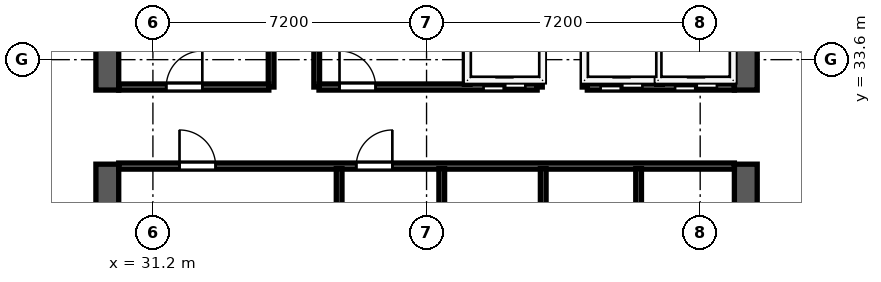
"""IFC4 building model, lengths in metres.
Left out: names, types, materials, properties, quantities, classifications, styles, units other than length and angle.
Written with IfcOpenShell. Run it as: python <this file> out.ifc"""

import sys

from ifc_helpers import new_model, si_unit, direction, frame, frame_2d, origin, place, context, subcontext, project, spatial, rectangle, extrude, element, fill, save


model = new_model("IFC4")
c1 = context("Model", 3, precision=1e-05, world=origin(), true_north=direction((0.0, 1.0)))
c2 = subcontext(c1, "Body", "Model", "MODEL_VIEW")
j1 = project(units=[si_unit("LENGTHUNIT", "METRE"), si_unit("PLANEANGLEUNIT", "RADIAN")], contexts=[c1])
p1 = place(None, origin())
s1 = spatial("IfcSite", under=j1, at=p1, CompositionType="ELEMENT")
p2 = place(p1, origin())
s2 = spatial("IfcBuilding", under=s1, at=p2, CompositionType="ELEMENT")
p3 = place(p2, frame((0.0, 0.0, 223.0)))
s3 = spatial("IfcBuildingStorey", under=s2, at=p3, CompositionType="ELEMENT", Elevation=223.0)
p4 = place(p3, frame((30.0, 26.7, 0.0), z_axis=(0.0, 0.0, 1.0), x_axis=(0.0, 1.0, 0.0)))
e1 = element("IfcWall", 1, at=p4, inside=s3, PredefinedType="SHEAR", context=c2, shape_type="SweptSolid", body=[
    extrude(rectangle(XDim=4.15, YDim=0.6, at=frame_2d((2.075, 0.0))), origin(), (0.0, 0.0, 1.0), 3.62),
])
p5 = place(p3, frame((30.0, 32.8, 0.0), z_axis=(0.0, 0.0, 1.0), x_axis=(0.0, 1.0, 0.0)))
e2 = element("IfcWall", 2, at=p5, inside=s3, PredefinedType="SHEAR", context=c2, shape_type="SweptSolid", body=[
    extrude(rectangle(XDim=10.1, YDim=0.6, at=frame_2d((5.05, 0.0))), origin(), (0.0, 0.0, 1.0), 3.62),
])
p6 = place(p3, frame((46.8, 26.7, 0.0), z_axis=(0.0, 0.0, 1.0), x_axis=(0.0, 1.0, 0.0)))
e3 = element("IfcWall", 3, at=p6, inside=s3, PredefinedType="SHEAR", context=c2, shape_type="SweptSolid", body=[
    extrude(rectangle(XDim=4.15, YDim=0.6, at=frame_2d((2.075, 0.0))), origin(), (0.0, 0.0, 1.0), 3.62),
])
p7 = place(p3, frame((46.8, 32.8, 0.0), z_axis=(0.0, 0.0, 1.0), x_axis=(0.0, 1.0, 0.0)))
e4 = element("IfcWall", 4, at=p7, inside=s3, PredefinedType="SHEAR", context=c2, shape_type="SweptSolid", body=[
    extrude(rectangle(XDim=10.1, YDim=0.6, at=frame_2d((5.05, 0.0))), origin(), (0.0, 0.0, 1.0), 3.62),
])
for number, where, z_axis, x_axis in (
    (5, (34.31, 32.88, 0.0), (0.0, 0.0, 1.0), (0.0, 1.0, 0.0)),
    (6, (35.51, 32.88, 0.0), (0.0, 0.0, 1.0), (0.0, 1.0, 0.0)),
    (7, (41.37, 32.88, 0.0), (0.0, 0.0, 1.0), (0.0, 1.0, 0.0)),
    (8, (42.57, 32.88, 0.0), (0.0, 0.0, 1.0), (0.0, 1.0, 0.0)),
):
    element("IfcWall", number, at=place(p3, frame(where, z_axis=z_axis, x_axis=x_axis)), inside=s3, PredefinedType="SOLIDWALL", context=c2, shape_type="SweptSolid", body=[
        extrude(rectangle(XDim=2.17, YDim=0.15, at=frame_2d((1.085, 0.0))), origin(), (0.0, 0.0, 1.0), 3.62),
    ])
p8 = place(p3, frame((30.3, 32.88, 0.0), z_axis=(0.0, 0.0, 1.0), x_axis=(1.0, 0.0, 0.0)))
e9 = element("IfcWall", 9, at=p8, inside=s3, PredefinedType="SOLIDWALL", context=c2, shape_type="SweptSolid", body=[
    extrude(rectangle(XDim=3.95, YDim=0.16, at=frame_2d((1.975, 0.0))), origin(), (0.0, 0.0, 1.0), 3.62),
])
p9 = place(p8, frame((2.2, 0.0, 0.0), z_axis=(0.0, 0.0, 1.0), x_axis=(-1.0, 0.0, 0.0)))
e10 = element("IfcOpeningElement", 10, at=p9, cuts=e9, PredefinedType="OPENING", context=c2, shape_type="SweptSolid", body=[
    extrude(rectangle(XDim=0.95, YDim=2.12, at=frame_2d((0.475, 1.06))), frame((0.0, 0.09, 0.0), z_axis=(0.0, -1.0, 0.0), x_axis=(1.0, 0.0, 0.0)), (0.0, 0.0, 1.0), 0.18),
])
p10 = place(p3, frame((35.57, 32.88, 0.0), z_axis=(0.0, 0.0, 1.0), x_axis=(1.0, 0.0, 0.0)))
e11 = element("IfcWall", 11, at=p10, inside=s3, PredefinedType="SOLIDWALL", context=c2, shape_type="SweptSolid", body=[
    extrude(rectangle(XDim=5.74, YDim=0.16, at=frame_2d((2.87, 0.0))), origin(), (0.0, 0.0, 1.0), 3.62),
])
p11 = place(p10, frame((1.49, 0.0, 0.0), z_axis=(0.0, 0.0, 1.0), x_axis=(-1.0, 0.0, 0.0)))
e12 = element("IfcOpeningElement", 12, at=p11, cuts=e11, PredefinedType="OPENING", context=c2, shape_type="SweptSolid", body=[
    extrude(rectangle(XDim=0.95, YDim=2.12, at=frame_2d((0.475, 1.06))), frame((0.0, 0.09, 0.0), z_axis=(0.0, -1.0, 0.0), x_axis=(1.0, 0.0, 0.0)), (0.0, 0.0, 1.0), 0.18),
])
p12 = place(p10, frame((5.43, 0.0, 0.0), z_axis=(0.0, 0.0, 1.0), x_axis=(-1.0, 0.0, 0.0)))
e13 = element("IfcOpeningElement", 13, at=p12, cuts=e11, PredefinedType="OPENING", context=c2, shape_type="SweptSolid", body=[
    extrude(rectangle(XDim=1.1, YDim=2.2, at=frame_2d((0.55, 1.1))), frame((0.0, 0.09, 0.0), z_axis=(0.0, -1.0, 0.0), x_axis=(1.0, 0.0, 0.0)), (0.0, 0.0, 1.0), 0.18),
])
p13 = place(p3, frame((42.63, 32.88, 0.0), z_axis=(0.0, 0.0, 1.0), x_axis=(1.0, 0.0, 0.0)))
e14 = element("IfcWall", 14, at=p13, inside=s3, PredefinedType="SOLIDWALL", context=c2, shape_type="SweptSolid", body=[
    extrude(rectangle(XDim=3.87, YDim=0.16, at=frame_2d((1.935, 0.0))), origin(), (0.0, 0.0, 1.0), 3.62),
])
p14 = place(p13, frame((1.45, 0.0, 0.0), z_axis=(0.0, 0.0, 1.0), x_axis=(-1.0, 0.0, 0.0)))
e15 = element("IfcOpeningElement", 15, at=p14, cuts=e14, PredefinedType="OPENING", context=c2, shape_type="SweptSolid", body=[
    extrude(rectangle(XDim=1.1, YDim=2.2, at=frame_2d((0.55, 1.1))), frame((0.0, 0.09, 0.0), z_axis=(0.0, -1.0, 0.0), x_axis=(1.0, 0.0, 0.0)), (0.0, 0.0, 1.0), 0.18),
])
p15 = place(p13, frame((3.41, 0.0, 0.0), z_axis=(0.0, 0.0, 1.0), x_axis=(-1.0, 0.0, 0.0)))
e16 = element("IfcOpeningElement", 16, at=p15, cuts=e14, PredefinedType="OPENING", context=c2, shape_type="SweptSolid", body=[
    extrude(rectangle(XDim=1.1, YDim=2.2, at=frame_2d((0.55, 1.1))), frame((0.0, 0.09, 0.0), z_axis=(0.0, -1.0, 0.0), x_axis=(1.0, 0.0, 0.0)), (0.0, 0.0, 1.0), 0.18),
])
for number, where, z_axis, x_axis in (
    (17, (39.47, 32.95, 0.0), (0.0, 0.0, 1.0), (0.0, 1.0, 0.0)),
    (18, (44.53, 32.95, 0.0), (0.0, 0.0, 1.0), (0.0, 1.0, 0.0)),
):
    element("IfcWall", number, at=place(p3, frame(where, z_axis=z_axis, x_axis=x_axis)), inside=s3, PredefinedType="SOLIDWALL", context=c2, shape_type="SweptSolid", body=[
        extrude(rectangle(XDim=2.05, YDim=0.15, at=frame_2d((1.025, 0.0))), origin(), (0.0, 0.0, 1.0), 3.62),
    ])
p16 = place(p3, frame((30.3, 30.8, 0.0), z_axis=(0.0, 0.0, 1.0), x_axis=(1.0, 0.0, 0.0)))
e19 = element("IfcWall", 19, at=p16, inside=s3, PredefinedType="SOLIDWALL", context=c2, shape_type="SweptSolid", body=[
    extrude(rectangle(XDim=16.2, YDim=0.16, at=frame_2d((8.1, 0.0))), origin(), (0.0, 0.0, 1.0), 3.62),
])
p17 = place(p16, frame((1.6, 0.0, 0.0)))
e20 = element("IfcOpeningElement", 20, at=p17, cuts=e19, PredefinedType="OPENING", context=c2, shape_type="SweptSolid", body=[
    extrude(rectangle(XDim=0.95, YDim=2.12, at=frame_2d((0.475, 1.06))), frame((0.0, 0.09, 0.0), z_axis=(0.0, -1.0, 0.0), x_axis=(1.0, 0.0, 0.0)), (0.0, 0.0, 1.0), 0.18),
])
p18 = place(p16, frame((6.25, 0.0, 0.0)))
e21 = element("IfcOpeningElement", 21, at=p18, cuts=e19, PredefinedType="OPENING", context=c2, shape_type="SweptSolid", body=[
    extrude(rectangle(XDim=0.95, YDim=2.12, at=frame_2d((0.475, 1.06))), frame((0.0, 0.09, 0.0), z_axis=(0.0, -1.0, 0.0), x_axis=(1.0, 0.0, 0.0)), (0.0, 0.0, 1.0), 0.18),
])
p19 = place(p3, frame((38.8, 26.71, 0.0), z_axis=(0.0, 0.0, 1.0), x_axis=(0.0, 1.0, 0.0)))
e22 = element("IfcWall", 22, at=p19, inside=s3, PredefinedType="SOLIDWALL", context=c2, shape_type="SweptSolid", body=[
    extrude(rectangle(XDim=4.025, YDim=0.15, at=frame_2d((2.013, 0.0))), origin(), (0.0, 0.0, 1.0), 3.62),
])
p20 = place(p3, frame((36.1, 26.71, 0.0), z_axis=(0.0, 0.0, 1.0), x_axis=(0.0, 1.0, 0.0)))
e23 = element("IfcWall", 23, at=p20, inside=s3, PredefinedType="PARTITIONING", context=c2, shape_type="SweptSolid", body=[
    extrude(rectangle(XDim=4.025, YDim=0.15, at=frame_2d((2.013, 0.0))), origin(), (0.0, 0.0, 1.0), 3.62),
])
for number, where, z_axis, x_axis in (
    (24, (41.47, 28.75, 0.0), (0.0, 0.0, 1.0), (0.0, 1.0, 0.0)),
    (25, (43.98, 28.75, 0.0), (0.0, 0.0, 1.0), (0.0, 1.0, 0.0)),
):
    element("IfcWall", number, at=place(p3, frame(where, z_axis=z_axis, x_axis=x_axis)), inside=s3, PredefinedType="SOLIDWALL", context=c2, shape_type="SweptSolid", body=[
        extrude(rectangle(XDim=1.985, YDim=0.15, at=frame_2d((0.993, 0.0))), origin(), (0.0, 0.0, 1.0), 3.62),
    ])
p21 = place(p9, origin())
e26 = element("IfcDoor", 26, at=p21, inside=s3, OperationType="SINGLE_SWING_LEFT", PredefinedType="DOOR", context=c2, shape_type="SweptSolid", body=[
    extrude(rectangle(XDim=0.95, YDim=2.12, at=frame_2d((0.475, 1.06))), frame((0.0, 0.025, 0.0), z_axis=(0.0, -1.0, 0.0), x_axis=(1.0, 0.0, 0.0)), (0.0, 0.0, 1.0), 0.05),
])
fill(e10, e26)
p22 = place(p11, origin())
e27 = element("IfcDoor", 27, at=p22, inside=s3, OperationType="SINGLE_SWING_RIGHT", PredefinedType="DOOR", context=c2, shape_type="SweptSolid", body=[
    extrude(rectangle(XDim=0.95, YDim=2.12, at=frame_2d((0.475, 1.06))), frame((0.0, 0.025, 0.0), z_axis=(0.0, -1.0, 0.0), x_axis=(1.0, 0.0, 0.0)), (0.0, 0.0, 1.0), 0.05),
])
fill(e12, e27)
p23 = place(p12, origin())
e28 = element("IfcDoor", 28, at=p23, inside=s3, OperationType="SLIDING_TO_RIGHT", PredefinedType="DOOR", context=c2, shape_type="SweptSolid", body=[
    extrude(rectangle(XDim=1.1, YDim=2.2, at=frame_2d((0.55, 1.1))), frame((0.0, 0.025, 0.0), z_axis=(0.0, -1.0, 0.0), x_axis=(1.0, 0.0, 0.0)), (0.0, 0.0, 1.0), 0.05),
])
fill(e13, e28)
p24 = place(p14, origin())
e29 = element("IfcDoor", 29, at=p24, inside=s3, OperationType="SLIDING_TO_RIGHT", PredefinedType="DOOR", context=c2, shape_type="SweptSolid", body=[
    extrude(rectangle(XDim=1.1, YDim=2.2, at=frame_2d((0.55, 1.1))), frame((0.0, 0.025, 0.0), z_axis=(0.0, -1.0, 0.0), x_axis=(1.0, 0.0, 0.0)), (0.0, 0.0, 1.0), 0.05),
])
fill(e15, e29)
p25 = place(p15, origin())
e30 = element("IfcDoor", 30, at=p25, inside=s3, OperationType="SLIDING_TO_RIGHT", PredefinedType="DOOR", context=c2, shape_type="SweptSolid", body=[
    extrude(rectangle(XDim=1.1, YDim=2.2, at=frame_2d((0.55, 1.1))), frame((0.0, 0.025, 0.0), z_axis=(0.0, -1.0, 0.0), x_axis=(1.0, 0.0, 0.0)), (0.0, 0.0, 1.0), 0.05),
])
fill(e16, e30)
p26 = place(p17, origin())
e31 = element("IfcDoor", 31, at=p26, inside=s3, OperationType="SINGLE_SWING_LEFT", PredefinedType="DOOR", context=c2, shape_type="SweptSolid", body=[
    extrude(rectangle(XDim=0.95, YDim=2.12, at=frame_2d((0.475, 1.06))), frame((0.0, 0.025, 0.0), z_axis=(0.0, -1.0, 0.0), x_axis=(1.0, 0.0, 0.0)), (0.0, 0.0, 1.0), 0.05),
])
fill(e20, e31)
p27 = place(p18, origin())
e32 = element("IfcDoor", 32, at=p27, inside=s3, OperationType="SINGLE_SWING_RIGHT", PredefinedType="DOOR", context=c2, shape_type="SweptSolid", body=[
    extrude(rectangle(XDim=0.95, YDim=2.12, at=frame_2d((0.475, 1.06))), frame((0.0, 0.025, 0.0), z_axis=(0.0, -1.0, 0.0), x_axis=(1.0, 0.0, 0.0)), (0.0, 0.0, 1.0), 0.05),
])
fill(e21, e32)
save(model, sys.argv[1])
